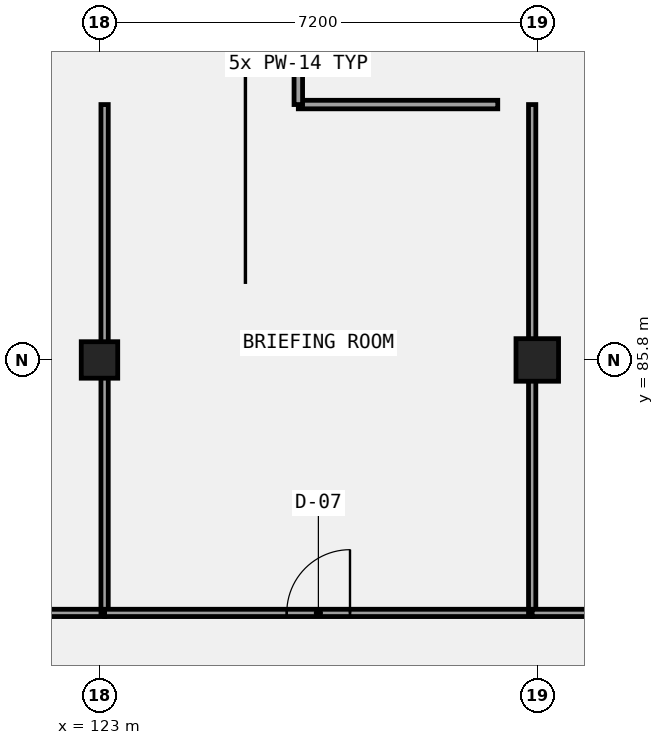
"""IFC4 building model, lengths in metres.
Left out: names, types, materials, properties, quantities, classifications, styles, units other than length and angle.
Written with IfcOpenShell. Run it as: python <this file> out.ifc"""

import sys

from ifc_helpers import new_model, si_unit, direction, frame, frame_2d, origin, origin_2d, place, context, subcontext, project, spatial, rectangle, extrude, element, fill, save


model = new_model("IFC4")
c1 = context("Model", 3, precision=1e-05, world=origin(), true_north=direction((0.0, 1.0)))
c2 = subcontext(c1, "Body", "Model", "MODEL_VIEW")
j1 = project(units=[si_unit("LENGTHUNIT", "METRE"), si_unit("PLANEANGLEUNIT", "RADIAN")], contexts=[c1])
p1 = place(None, origin())
s1 = spatial("IfcSite", under=j1, at=p1, CompositionType="ELEMENT")
p2 = place(p1, origin())
s2 = spatial("IfcBuilding", under=s1, at=p2, CompositionType="ELEMENT")
p3 = place(p2, frame((0.0, 0.0, 13.8)))
s3 = spatial("IfcBuildingStorey", under=s2, at=p3, CompositionType="ELEMENT", Elevation=13.8)
p4 = place(p3, frame((123.0, 85.8, 0.0), z_axis=(0.0, 0.0, 1.0), x_axis=(1.0, 0.0, 0.0)))
e1 = element("IfcColumn", 1, at=p4, inside=s3, PredefinedType="COLUMN", context=c2, shape_type="SweptSolid", body=[
    extrude(rectangle(XDim=0.6, YDim=0.6, at=origin_2d()), origin(), (0.0, 0.0, 1.0), 4.2),
])
p5 = place(p3, frame((130.2, 85.8, 0.0), z_axis=(0.0, 0.0, 1.0), x_axis=(1.0, 0.0, 0.0)))
e2 = element("IfcColumn", 2, at=p5, inside=s3, PredefinedType="COLUMN", context=c2, shape_type="SweptSolid", body=[
    extrude(rectangle(XDim=0.7, YDim=0.7, at=origin_2d()), origin(), (0.0, 0.0, 1.0), 4.2),
])
p6 = place(p3, frame((116.052, 81.64, 0.0), z_axis=(0.0, 0.0, 1.0), x_axis=(1.0, 0.0, 0.0)))
e3 = element("IfcWall", 3, at=p6, inside=s3, PredefinedType="PARTITIONING", context=c2, shape_type="SweptSolid", body=[
    extrude(rectangle(XDim=7.032, YDim=0.12, at=frame_2d((3.516, 0.0))), origin(), (0.0, 0.0, 1.0), 3.94),
])
p7 = place(p6, frame((3.026, 0.0, 0.0)))
e4 = element("IfcOpeningElement", 4, at=p7, cuts=e3, PredefinedType="OPENING", context=c2, shape_type="SweptSolid", body=[
    extrude(rectangle(XDim=0.98, YDim=2.35, at=frame_2d((0.49, 1.175))), frame((0.0, 0.07, 0.0), z_axis=(0.0, -1.0, 0.0), x_axis=(1.0, 0.0, 0.0)), (0.0, 0.0, 1.0), 0.14),
])
p8 = place(p3, frame((123.084, 81.64, 0.0), z_axis=(0.0, 0.0, 1.0), x_axis=(0.0, 1.0, 0.0)))
e5 = element("IfcWall", 5, at=p8, inside=s3, PredefinedType="PARTITIONING", context=c2, shape_type="SweptSolid", body=[
    extrude(rectangle(XDim=8.36, YDim=0.12, at=frame_2d((4.18, 0.0))), origin(), (0.0, 0.0, 1.0), 3.34),
])
p9 = place(p3, frame((123.084, 81.64, 0.0), z_axis=(0.0, 0.0, 1.0), x_axis=(1.0, 0.0, 0.0)))
e6 = element("IfcWall", 6, at=p9, inside=s3, PredefinedType="PARTITIONING", context=c2, shape_type="SweptSolid", body=[
    extrude(rectangle(XDim=7.032, YDim=0.12, at=frame_2d((3.516, 0.0))), origin(), (0.0, 0.0, 1.0), 3.94),
])
p10 = place(p9, frame((2.996, 0.0, 0.0)))
e7 = element("IfcOpeningElement", 7, at=p10, cuts=e6, PredefinedType="OPENING", context=c2, shape_type="SweptSolid", body=[
    extrude(rectangle(XDim=1.04, YDim=2.1, at=frame_2d((0.52, 1.05))), frame((0.0, 0.07, 0.0), z_axis=(0.0, -1.0, 0.0), x_axis=(1.0, 0.0, 0.0)), (0.0, 0.0, 1.0), 0.14),
])
p11 = place(p3, frame((130.116, 81.64, 0.0), z_axis=(0.0, 0.0, 1.0), x_axis=(0.0, 1.0, 0.0)))
e8 = element("IfcWall", 8, at=p11, inside=s3, PredefinedType="PARTITIONING", context=c2, shape_type="SweptSolid", body=[
    extrude(rectangle(XDim=8.36, YDim=0.12, at=frame_2d((4.18, 0.0))), origin(), (0.0, 0.0, 1.0), 3.29),
])
p12 = place(p3, frame((130.116, 81.64, 0.0), z_axis=(0.0, 0.0, 1.0), x_axis=(1.0, 0.0, 0.0)))
e9 = element("IfcWall", 9, at=p12, inside=s3, PredefinedType="PARTITIONING", context=c2, shape_type="SweptSolid", body=[
    extrude(rectangle(XDim=7.032, YDim=0.12, at=frame_2d((3.516, 0.0))), origin(), (0.0, 0.0, 1.0), 3.94),
])
p13 = place(p12, frame((2.996, 0.0, 0.0)))
e10 = element("IfcOpeningElement", 10, at=p13, cuts=e9, PredefinedType="OPENING", context=c2, shape_type="SweptSolid", body=[
    extrude(rectangle(XDim=1.04, YDim=2.22, at=frame_2d((0.52, 1.11))), frame((0.0, 0.07, 0.0), z_axis=(0.0, -1.0, 0.0), x_axis=(1.0, 0.0, 0.0)), (0.0, 0.0, 1.0), 0.14),
])
p14 = place(p3, frame((126.27, 90.0, 0.0), z_axis=(0.0, 0.0, 1.0), x_axis=(1.0, 0.0, 0.0)))
e11 = element("IfcWall", 11, at=p14, inside=s3, PredefinedType="PARTITIONING", context=c2, shape_type="SweptSolid", body=[
    extrude(rectangle(XDim=3.28, YDim=0.14, at=frame_2d((1.64, 0.0))), origin(), (0.0, 0.0, 1.0), 3.94),
])
p15 = place(p3, frame((126.27, 90.0, 0.0), z_axis=(0.0, 0.0, 1.0), x_axis=(0.0, 1.0, 0.0)))
e12 = element("IfcWall", 12, at=p15, inside=s3, PredefinedType="PARTITIONING", context=c2, shape_type="SweptSolid", body=[
    extrude(rectangle(XDim=5.425, YDim=0.14, at=frame_2d((2.712, 0.0))), origin(), (0.0, 0.0, 1.0), 3.94),
])
p16 = place(p15, frame((2.163, 0.0, 0.0)))
e13 = element("IfcOpeningElement", 13, at=p16, cuts=e12, PredefinedType="OPENING", context=c2, shape_type="SweptSolid", body=[
    extrude(rectangle(XDim=1.1, YDim=2.1, at=frame_2d((0.55, 1.05))), frame((0.0, 0.08, 0.0), z_axis=(0.0, -1.0, 0.0), x_axis=(1.0, 0.0, 0.0)), (0.0, 0.0, 1.0), 0.16),
])
p17 = place(p10, origin())
e14 = element("IfcDoor", 14, at=p17, inside=s3, OperationType="SINGLE_SWING_RIGHT", PredefinedType="DOOR", context=c2, shape_type="SweptSolid", body=[
    extrude(rectangle(XDim=1.04, YDim=2.1, at=frame_2d((0.52, 1.05))), frame((0.0, 0.025, 0.0), z_axis=(0.0, -1.0, 0.0), x_axis=(1.0, 0.0, 0.0)), (0.0, 0.0, 1.0), 0.05),
])
fill(e7, e14)
save(model, sys.argv[1])
